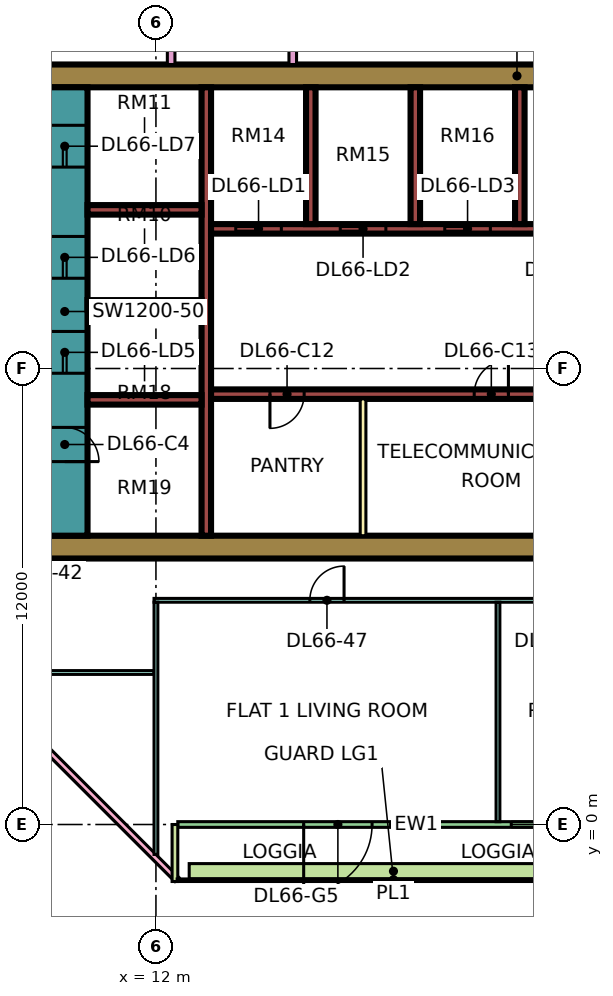
"""IFC4 building model, lengths in metres.
Left out: names, types, materials, properties, quantities, classifications, styles, units other than length and angle.
Written with IfcOpenShell. Run it as: python <this file> out.ifc"""

import sys

from ifc_helpers import new_model, si_unit, direction, frame, frame_2d, origin, place, context, subcontext, project, spatial, rectangle, extrude, element, fill, save


model = new_model("IFC4")
c1 = context("Model", 3, precision=1e-05, world=origin(), true_north=direction((0.0, 1.0)))
c2 = subcontext(c1, "Body", "Model", "MODEL_VIEW")
j1 = project(units=[si_unit("LENGTHUNIT", "METRE"), si_unit("PLANEANGLEUNIT", "RADIAN")], contexts=[c1])
p1 = place(None, origin())
s1 = spatial("IfcSite", under=j1, at=p1, CompositionType="ELEMENT")
p2 = place(p1, origin())
s2 = spatial("IfcBuilding", under=s1, at=p2, CompositionType="ELEMENT")
p3 = place(p2, frame((0.0, 0.0, 284.65)))
s3 = spatial("IfcBuildingStorey", under=s2, at=p3, CompositionType="ELEMENT", Elevation=284.65)
p4 = place(p3, frame((9.0, 7.3, 0.0), z_axis=(0.0, 0.0, 1.0), x_axis=(1.0, 0.0, 0.0)))
e1 = element("IfcWall", 1, at=p4, inside=s3, PredefinedType="SHEAR", context=c2, shape_type="SweptSolid", body=[
    extrude(rectangle(XDim=25.0, YDim=0.6, at=frame_2d((12.5, 0.0))), origin(), (0.0, 0.0, 1.0), 3.75),
])
p5 = place(p3, frame((9.0, 19.7, 0.0), z_axis=(0.0, 0.0, 1.0), x_axis=(1.0, 0.0, 0.0)))
e2 = element("IfcWall", 2, at=p5, inside=s3, PredefinedType="SHEAR", context=c2, shape_type="SweptSolid", body=[
    extrude(rectangle(XDim=25.0, YDim=0.6, at=frame_2d((12.5, 0.0))), origin(), (0.0, 0.0, 1.0), 3.75),
])
p6 = place(p5, frame((19.1, 0.0, 0.0)))
e3 = element("IfcOpeningElement", 3, at=p6, cuts=e2, PredefinedType="OPENING", context=c2, shape_type="SweptSolid", body=[
    extrude(rectangle(XDim=1.8, YDim=2.4, at=frame_2d((0.9, 1.2))), frame((0.0, 0.31, 0.0), z_axis=(0.0, -1.0, 0.0), x_axis=(1.0, 0.0, 0.0)), (0.0, 0.0, 1.0), 0.62),
])
p7 = place(p3, frame((9.6, 7.6, 0.0), z_axis=(0.0, 0.0, 1.0), x_axis=(0.0, 1.0, 0.0)))
e4 = element("IfcWall", 4, at=p7, inside=s3, PredefinedType="SHEAR", context=c2, shape_type="SweptSolid", body=[
    extrude(rectangle(XDim=11.8, YDim=1.2, at=frame_2d((5.9, 0.0))), origin(), (0.0, 0.0, 1.0), 3.75),
])
p8 = place(p7, frame((4.275, 0.0, 0.0)))
e5 = element("IfcOpeningElement", 5, at=p8, cuts=e4, PredefinedType="OPENING", context=c2, shape_type="SweptSolid", body=[
    extrude(rectangle(XDim=1.1, YDim=2.2, at=frame_2d((0.55, 1.1))), frame((0.0, 0.61, 0.0), z_axis=(0.0, -1.0, 0.0), x_axis=(1.0, 0.0, 0.0)), (0.0, 0.0, 1.0), 1.22),
])
p9 = place(p7, frame((6.775, 0.0, 0.0)))
e6 = element("IfcOpeningElement", 6, at=p9, cuts=e4, PredefinedType="OPENING", context=c2, shape_type="SweptSolid", body=[
    extrude(rectangle(XDim=1.1, YDim=2.2, at=frame_2d((0.55, 1.1))), frame((0.0, 0.61, 0.0), z_axis=(0.0, -1.0, 0.0), x_axis=(1.0, 0.0, 0.0)), (0.0, 0.0, 1.0), 1.22),
])
p10 = place(p7, frame((9.7, 0.0, 0.0)))
e7 = element("IfcOpeningElement", 7, at=p10, cuts=e4, PredefinedType="OPENING", context=c2, shape_type="SweptSolid", body=[
    extrude(rectangle(XDim=1.1, YDim=2.2, at=frame_2d((0.55, 1.1))), frame((0.0, 0.61, 0.0), z_axis=(0.0, -1.0, 0.0), x_axis=(1.0, 0.0, 0.0)), (0.0, 0.0, 1.0), 1.22),
])
p11 = place(p7, frame((1.95, 0.0, 0.0)))
e8 = element("IfcOpeningElement", 8, at=p11, cuts=e4, PredefinedType="OPENING", context=c2, shape_type="SweptSolid", body=[
    extrude(rectangle(XDim=0.9, YDim=2.1, at=frame_2d((0.45, 1.05))), frame((0.0, 0.61, 0.0), z_axis=(0.0, -1.0, 0.0), x_axis=(1.0, 0.0, 0.0)), (0.0, 0.0, 1.0), 1.22),
])
p12 = place(p3, frame((13.325, 7.6, 0.0), z_axis=(0.0, 0.0, 1.0), x_axis=(0.0, 1.0, 0.0)))
e9 = element("IfcWall", 9, at=p12, inside=s3, PredefinedType="SHEAR", context=c2, shape_type="SweptSolid", body=[
    extrude(rectangle(XDim=11.8, YDim=0.25, at=frame_2d((5.9, 0.0))), origin(), (0.0, 0.0, 1.0), 3.75),
])
p13 = place(p3, frame((13.45, 11.325, 0.0), z_axis=(0.0, 0.0, 1.0), x_axis=(1.0, 0.0, 0.0)))
e10 = element("IfcWall", 10, at=p13, inside=s3, PredefinedType="SHEAR", context=c2, shape_type="SweptSolid", body=[
    extrude(rectangle(XDim=19.95, YDim=0.25, at=frame_2d((9.975, 0.0))), origin(), (0.0, 0.0, 1.0), 3.75),
])
p14 = place(p13, frame((1.55, 0.0, 0.0)))
e11 = element("IfcOpeningElement", 11, at=p14, cuts=e10, PredefinedType="OPENING", context=c2, shape_type="SweptSolid", body=[
    extrude(rectangle(XDim=0.9, YDim=2.1, at=frame_2d((0.45, 1.05))), frame((0.0, 0.135, 0.0), z_axis=(0.0, -1.0, 0.0), x_axis=(1.0, 0.0, 0.0)), (0.0, 0.0, 1.0), 0.27),
])
p15 = place(p13, frame((6.925, 0.0, 0.0)))
e12 = element("IfcOpeningElement", 12, at=p15, cuts=e10, PredefinedType="OPENING", context=c2, shape_type="SweptSolid", body=[
    extrude(rectangle(XDim=0.9, YDim=2.1, at=frame_2d((0.45, 1.05))), frame((0.0, 0.135, 0.0), z_axis=(0.0, -1.0, 0.0), x_axis=(1.0, 0.0, 0.0)), (0.0, 0.0, 1.0), 0.27),
])
p16 = place(p13, frame((15.025, 0.0, 0.0)))
e13 = element("IfcOpeningElement", 13, at=p16, cuts=e10, PredefinedType="OPENING", context=c2, shape_type="SweptSolid", body=[
    extrude(rectangle(XDim=0.9, YDim=2.1, at=frame_2d((0.45, 1.05))), frame((0.0, 0.135, 0.0), z_axis=(0.0, -1.0, 0.0), x_axis=(1.0, 0.0, 0.0)), (0.0, 0.0, 1.0), 0.27),
])
p17 = place(p3, frame((13.45, 15.675, 0.0), z_axis=(0.0, 0.0, 1.0), x_axis=(1.0, 0.0, 0.0)))
e14 = element("IfcWall", 14, at=p17, inside=s3, PredefinedType="SHEAR", context=c2, shape_type="SweptSolid", body=[
    extrude(rectangle(XDim=13.75, YDim=0.25, at=frame_2d((6.875, 0.0))), origin(), (0.0, 0.0, 1.0), 3.75),
])
p18 = place(p17, frame((0.65, 0.0, 0.0)))
e15 = element("IfcOpeningElement", 15, at=p18, cuts=e14, PredefinedType="OPENING", context=c2, shape_type="SweptSolid", body=[
    extrude(rectangle(XDim=1.2, YDim=2.2, at=frame_2d((0.6, 1.1))), frame((0.0, 0.135, 0.0), z_axis=(0.0, -1.0, 0.0), x_axis=(1.0, 0.0, 0.0)), (0.0, 0.0, 1.0), 0.27),
])
p19 = place(p17, frame((3.4, 0.0, 0.0)))
e16 = element("IfcOpeningElement", 16, at=p19, cuts=e14, PredefinedType="OPENING", context=c2, shape_type="SweptSolid", body=[
    extrude(rectangle(XDim=1.2, YDim=2.2, at=frame_2d((0.6, 1.1))), frame((0.0, 0.135, 0.0), z_axis=(0.0, -1.0, 0.0), x_axis=(1.0, 0.0, 0.0)), (0.0, 0.0, 1.0), 0.27),
])
p20 = place(p17, frame((6.15, 0.0, 0.0)))
e17 = element("IfcOpeningElement", 17, at=p20, cuts=e14, PredefinedType="OPENING", context=c2, shape_type="SweptSolid", body=[
    extrude(rectangle(XDim=1.2, YDim=2.2, at=frame_2d((0.6, 1.1))), frame((0.0, 0.135, 0.0), z_axis=(0.0, -1.0, 0.0), x_axis=(1.0, 0.0, 0.0)), (0.0, 0.0, 1.0), 0.27),
])
p21 = place(p17, frame((8.9, 0.0, 0.0)))
e18 = element("IfcOpeningElement", 18, at=p21, cuts=e14, PredefinedType="OPENING", context=c2, shape_type="SweptSolid", body=[
    extrude(rectangle(XDim=1.2, YDim=2.2, at=frame_2d((0.6, 1.1))), frame((0.0, 0.135, 0.0), z_axis=(0.0, -1.0, 0.0), x_axis=(1.0, 0.0, 0.0)), (0.0, 0.0, 1.0), 0.27),
])
p22 = place(p17, frame((11.8, 0.0, 0.0)))
e19 = element("IfcOpeningElement", 19, at=p22, cuts=e14, PredefinedType="OPENING", context=c2, shape_type="SweptSolid", body=[
    extrude(rectangle(XDim=0.9, YDim=2.1, at=frame_2d((0.45, 1.05))), frame((0.0, 0.135, 0.0), z_axis=(0.0, -1.0, 0.0), x_axis=(1.0, 0.0, 0.0)), (0.0, 0.0, 1.0), 0.27),
])
for number, where, z_axis, x_axis in (
    (20, (10.2, 11.175, 0.0), (0.0, 0.0, 1.0), (1.0, 0.0, 0.0)),
    (21, (10.2, 13.675, 0.0), (0.0, 0.0, 1.0), (1.0, 0.0, 0.0)),
    (22, (10.2, 16.175, 0.0), (0.0, 0.0, 1.0), (1.0, 0.0, 0.0)),
):
    element("IfcWall", number, at=place(p3, frame(where, z_axis=z_axis, x_axis=x_axis)), inside=s3, PredefinedType="SHEAR", context=c2, shape_type="SweptSolid", body=[
        extrude(rectangle(XDim=3.0, YDim=0.25, at=frame_2d((1.5, 0.0))), origin(), (0.0, 0.0, 1.0), 3.75),
    ])
for number, where, z_axis, x_axis in (
    (23, (16.075, 15.8, 0.0), (0.0, 0.0, 1.0), (0.0, 1.0, 0.0)),
    (24, (18.825, 15.8, 0.0), (0.0, 0.0, 1.0), (0.0, 1.0, 0.0)),
    (25, (21.575, 15.8, 0.0), (0.0, 0.0, 1.0), (0.0, 1.0, 0.0)),
):
    element("IfcWall", number, at=place(p3, frame(where, z_axis=z_axis, x_axis=x_axis)), inside=s3, PredefinedType="SHEAR", context=c2, shape_type="SweptSolid", body=[
        extrude(rectangle(XDim=3.6, YDim=0.25, at=frame_2d((1.8, 0.0))), origin(), (0.0, 0.0, 1.0), 3.75),
    ])
p23 = place(p3, frame((-1.447, 12.553, 0.0), z_axis=(0.0, 0.0, 1.0), x_axis=(0.707106781187, -0.707106781187, 0.0)))
e26 = element("IfcWall", 26, at=p23, inside=s3, PredefinedType="SOLIDWALL", context=c2, shape_type="SweptSolid", body=[
    extrude(rectangle(XDim=19.799, YDim=0.15, at=frame_2d((9.899, 0.0))), origin(), (0.0, 0.0, 1.0), 3.35),
])
p24 = place(p23, frame((2.212, 0.0, 0.45)))
e27 = element("IfcOpeningElement", 27, at=p24, cuts=e26, PredefinedType="OPENING", context=c2, shape_type="SweptSolid", body=[
    extrude(rectangle(XDim=3.0, YDim=2.4, at=frame_2d((1.5, 1.2))), frame((0.0, 0.085, 0.0), z_axis=(0.0, -1.0, 0.0), x_axis=(1.0, 0.0, 0.0)), (0.0, 0.0, 1.0), 0.17),
])
p25 = place(p23, frame((10.216, 0.0, 0.45)))
e28 = element("IfcOpeningElement", 28, at=p25, cuts=e26, PredefinedType="OPENING", context=c2, shape_type="SweptSolid", body=[
    extrude(rectangle(XDim=3.0, YDim=2.4, at=frame_2d((1.5, 1.2))), frame((0.0, 0.085, 0.0), z_axis=(0.0, -1.0, 0.0), x_axis=(1.0, 0.0, 0.0)), (0.0, 0.0, 1.0), 0.17),
])
p26 = place(p3, frame((12.575, 0.0, 0.0), z_axis=(0.0, 0.0, 1.0), x_axis=(1.0, 0.0, 0.0)))
e29 = element("IfcWall", 29, at=p26, inside=s3, PredefinedType="SOLIDWALL", context=c2, shape_type="SweptSolid", body=[
    extrude(rectangle(XDim=11.35, YDim=0.15, at=frame_2d((5.675, 0.0))), origin(), (0.0, 0.0, 1.0), 3.35),
])
p27 = place(p26, frame((3.312, 0.0, 0.0)))
e30 = element("IfcOpeningElement", 30, at=p27, cuts=e29, PredefinedType="OPENING", context=c2, shape_type="SweptSolid", body=[
    extrude(rectangle(XDim=1.8, YDim=2.4, at=frame_2d((0.9, 1.2))), frame((0.0, 0.085, 0.0), z_axis=(0.0, -1.0, 0.0), x_axis=(1.0, 0.0, 0.0)), (0.0, 0.0, 1.0), 0.17),
])
p28 = place(p26, frame((8.775, 0.0, 0.45)))
e31 = element("IfcOpeningElement", 31, at=p28, cuts=e29, PredefinedType="OPENING", context=c2, shape_type="SweptSolid", body=[
    extrude(rectangle(XDim=1.8, YDim=2.4, at=frame_2d((0.9, 1.2))), frame((0.0, 0.085, 0.0), z_axis=(0.0, -1.0, 0.0), x_axis=(1.0, 0.0, 0.0)), (0.0, 0.0, 1.0), 0.17),
])
p29 = place(p3, frame((12.5, -1.5, 0.0), z_axis=(0.0, 0.0, 1.0), x_axis=(0.0, 1.0, 0.0)))
e32 = element("IfcWall", 32, at=p29, inside=s3, PredefinedType="SOLIDWALL", context=c2, shape_type="SweptSolid", body=[
    extrude(rectangle(XDim=1.5, YDim=0.15, at=frame_2d((0.75, 0.0))), origin(), (0.0, 0.0, 1.0), 3.35),
])
p30 = place(p3, frame((12.875, -1.229, 0.0), z_axis=(0.0, 0.0, 1.0), x_axis=(1.0, 0.0, 0.0)))
e33 = element("IfcWall", 33, at=p30, inside=s3, PredefinedType="SOLIDWALL", context=c2, shape_type="SweptSolid", body=[
    extrude(rectangle(XDim=10.75, YDim=0.4, at=frame_2d((5.375, 0.0))), origin(), (0.0, 0.0, 1.0), 0.7),
])
p31 = place(p3, frame((17.45, 7.6, 0.0), z_axis=(0.0, 0.0, 1.0), x_axis=(0.0, 1.0, 0.0)))
e34 = element("IfcWall", 34, at=p31, inside=s3, PredefinedType="PARTITIONING", context=c2, shape_type="SweptSolid", body=[
    extrude(rectangle(XDim=3.6, YDim=0.15, at=frame_2d((1.8, 0.0))), origin(), (0.0, 0.0, 1.0), 3.35),
])
p32 = place(p3, frame((9.05, 4.0, 0.0), z_axis=(0.0, 0.0, 1.0), x_axis=(1.0, 0.0, 0.0)))
e35 = element("IfcWall", 35, at=p32, inside=s3, PredefinedType="PARTITIONING", context=c2, shape_type="SweptSolid", body=[
    extrude(rectangle(XDim=2.9, YDim=0.1, at=frame_2d((1.45, 0.0))), origin(), (0.0, 0.0, 1.0), 3.35),
])
p33 = place(p3, frame((11.95, 5.9, 0.0), z_axis=(0.0, 0.0, 1.0), x_axis=(1.0, 0.0, 0.0)))
e36 = element("IfcWall", 36, at=p33, inside=s3, PredefinedType="PARTITIONING", context=c2, shape_type="SweptSolid", body=[
    extrude(rectangle(XDim=21.1, YDim=0.1, at=frame_2d((10.55, 0.0))), origin(), (0.0, 0.0, 1.0), 3.35),
])
p34 = place(p33, frame((10.1, 0.0, 0.0)))
e37 = element("IfcOpeningElement", 37, at=p34, cuts=e36, PredefinedType="OPENING", context=c2, shape_type="SweptSolid", body=[
    extrude(rectangle(XDim=0.9, YDim=2.1, at=frame_2d((0.45, 1.05))), frame((0.0, 0.06, 0.0), z_axis=(0.0, -1.0, 0.0), x_axis=(1.0, 0.0, 0.0)), (0.0, 0.0, 1.0), 0.12),
])
p35 = place(p33, frame((13.1, 0.0, 0.0)))
e38 = element("IfcOpeningElement", 38, at=p35, cuts=e36, PredefinedType="OPENING", context=c2, shape_type="SweptSolid", body=[
    extrude(rectangle(XDim=0.9, YDim=2.1, at=frame_2d((0.45, 1.05))), frame((0.0, 0.06, 0.0), z_axis=(0.0, -1.0, 0.0), x_axis=(1.0, 0.0, 0.0)), (0.0, 0.0, 1.0), 0.12),
])
p36 = place(p33, frame((16.1, 0.0, 0.0)))
e39 = element("IfcOpeningElement", 39, at=p36, cuts=e36, PredefinedType="OPENING", context=c2, shape_type="SweptSolid", body=[
    extrude(rectangle(XDim=0.9, YDim=2.1, at=frame_2d((0.45, 1.05))), frame((0.0, 0.06, 0.0), z_axis=(0.0, -1.0, 0.0), x_axis=(1.0, 0.0, 0.0)), (0.0, 0.0, 1.0), 0.12),
])
p37 = place(p33, frame((4.1, 0.0, 0.0)))
e40 = element("IfcOpeningElement", 40, at=p37, cuts=e36, PredefinedType="OPENING", context=c2, shape_type="SweptSolid", body=[
    extrude(rectangle(XDim=0.9, YDim=2.1, at=frame_2d((0.45, 1.05))), frame((0.0, 0.06, 0.0), z_axis=(0.0, -1.0, 0.0), x_axis=(1.0, 0.0, 0.0)), (0.0, 0.0, 1.0), 0.12),
])
p38 = place(p3, frame((12.0, -0.788, 0.0), z_axis=(0.0, 0.0, 1.0), x_axis=(0.0, 1.0, 0.0)))
e41 = element("IfcWall", 41, at=p38, inside=s3, PredefinedType="PARTITIONING", context=c2, shape_type="SweptSolid", body=[
    extrude(rectangle(XDim=6.638, YDim=0.1, at=frame_2d((3.319, 0.0))), origin(), (0.0, 0.0, 1.0), 3.35),
])
p39 = place(p3, frame((12.4, 20.0, 0.0), z_axis=(0.0, 0.0, 1.0), x_axis=(0.0, 1.0, 0.0)))
e42 = element("IfcWall", 42, at=p39, inside=s3, PredefinedType="PARTITIONING", context=c2, shape_type="SweptSolid", body=[
    extrude(rectangle(XDim=33.926, YDim=0.2, at=frame_2d((16.963, 0.0))), origin(), (0.0, 0.0, 1.0), 3.35),
])
p40 = place(p39, frame((25.8, 0.0, 0.0)))
e43 = element("IfcOpeningElement", 43, at=p40, cuts=e42, PredefinedType="OPENING", context=c2, shape_type="SweptSolid", body=[
    extrude(rectangle(XDim=1.0, YDim=2.1, at=frame_2d((0.5, 1.05))), frame((0.0, 0.11, 0.0), z_axis=(0.0, -1.0, 0.0), x_axis=(1.0, 0.0, 0.0)), (0.0, 0.0, 1.0), 0.22),
])
p41 = place(p39, frame((0.6, 0.0, 0.0)))
e44 = element("IfcOpeningElement", 44, at=p41, cuts=e42, PredefinedType="OPENING", context=c2, shape_type="SweptSolid", body=[
    extrude(rectangle(XDim=1.2, YDim=2.1, at=frame_2d((0.6, 1.05))), frame((0.0, 0.11, 0.0), z_axis=(0.0, -1.0, 0.0), x_axis=(1.0, 0.0, 0.0)), (0.0, 0.0, 1.0), 0.22),
])
p42 = place(p39, frame((4.5, 0.0, 0.0)))
e45 = element("IfcOpeningElement", 45, at=p42, cuts=e42, PredefinedType="OPENING", context=c2, shape_type="SweptSolid", body=[
    extrude(rectangle(XDim=1.0, YDim=2.1, at=frame_2d((0.5, 1.05))), frame((0.0, 0.11, 0.0), z_axis=(0.0, -1.0, 0.0), x_axis=(1.0, 0.0, 0.0)), (0.0, 0.0, 1.0), 0.22),
])
p43 = place(p3, frame((15.6, 20.0, 0.0), z_axis=(0.0, 0.0, 1.0), x_axis=(0.0, 1.0, 0.0)))
e46 = element("IfcWall", 46, at=p43, inside=s3, PredefinedType="PARTITIONING", context=c2, shape_type="SweptSolid", body=[
    extrude(rectangle(XDim=27.775, YDim=0.2, at=frame_2d((13.887, 0.0))), origin(), (0.0, 0.0, 1.0), 3.35),
])
p44 = place(p43, frame((5.95, 0.0, 0.0)))
e47 = element("IfcOpeningElement", 47, at=p44, cuts=e46, PredefinedType="OPENING", context=c2, shape_type="SweptSolid", body=[
    extrude(rectangle(XDim=1.0, YDim=2.1, at=frame_2d((0.5, 1.05))), frame((0.0, 0.11, 0.0), z_axis=(0.0, -1.0, 0.0), x_axis=(1.0, 0.0, 0.0)), (0.0, 0.0, 1.0), 0.22),
])
p45 = place(p43, frame((12.0, 0.0, 0.0)))
e48 = element("IfcOpeningElement", 48, at=p45, cuts=e46, PredefinedType="OPENING", context=c2, shape_type="SweptSolid", body=[
    extrude(rectangle(XDim=1.0, YDim=2.1, at=frame_2d((0.5, 1.05))), frame((0.0, 0.11, 0.0), z_axis=(0.0, -1.0, 0.0), x_axis=(1.0, 0.0, 0.0)), (0.0, 0.0, 1.0), 0.22),
])
p46 = place(p43, frame((22.9, 0.0, 0.0)))
e49 = element("IfcOpeningElement", 49, at=p46, cuts=e46, PredefinedType="OPENING", context=c2, shape_type="SweptSolid", body=[
    extrude(rectangle(XDim=1.0, YDim=2.1, at=frame_2d((0.5, 1.05))), frame((0.0, 0.11, 0.0), z_axis=(0.0, -1.0, 0.0), x_axis=(1.0, 0.0, 0.0)), (0.0, 0.0, 1.0), 0.22),
])
p47 = place(p43, frame((1.15, 0.0, 0.0)))
e50 = element("IfcOpeningElement", 50, at=p47, cuts=e46, PredefinedType="OPENING", context=c2, shape_type="SweptSolid", body=[
    extrude(rectangle(XDim=1.8, YDim=2.1, at=frame_2d((0.9, 1.05))), frame((0.0, 0.11, 0.0), z_axis=(0.0, -1.0, 0.0), x_axis=(1.0, 0.0, 0.0)), (0.0, 0.0, 1.0), 0.22),
])
p48 = place(p43, frame((25.9, 0.0, 0.0)))
e51 = element("IfcOpeningElement", 51, at=p48, cuts=e46, PredefinedType="OPENING", context=c2, shape_type="SweptSolid", body=[
    extrude(rectangle(XDim=1.0, YDim=2.1, at=frame_2d((0.5, 1.05))), frame((0.0, 0.11, 0.0), z_axis=(0.0, -1.0, 0.0), x_axis=(1.0, 0.0, 0.0)), (0.0, 0.0, 1.0), 0.22),
])
p49 = place(p3, frame((21.0, 0.074, 0.0), z_axis=(0.0, 0.0, 1.0), x_axis=(0.0, 1.0, 0.0)))
e52 = element("IfcWall", 52, at=p49, inside=s3, PredefinedType="PARTITIONING", context=c2, shape_type="SweptSolid", body=[
    extrude(rectangle(XDim=5.776, YDim=0.1, at=frame_2d((2.888, 0.0))), origin(), (0.0, 0.0, 1.0), 3.35),
])
p50 = place(p27, frame((1.8, 0.0, 0.0), z_axis=(0.0, 0.0, 1.0), x_axis=(-1.0, 0.0, 0.0)))
e53 = element("IfcDoor", 53, at=p50, inside=s3, OperationType="DOUBLE_DOOR_SINGLE_SWING", PredefinedType="DOOR", context=c2, shape_type="SweptSolid", body=[
    extrude(rectangle(XDim=1.8, YDim=2.4, at=frame_2d((0.9, 1.2))), frame((0.0, 0.025, 0.0), z_axis=(0.0, -1.0, 0.0), x_axis=(1.0, 0.0, 0.0)), (0.0, 0.0, 1.0), 0.05),
])
fill(e30, e53)
p51 = place(p28, origin())
e54 = element("IfcWindow", 54, at=p51, inside=s3, PartitioningType="SINGLE_PANEL", PredefinedType="WINDOW", context=c2, shape_type="SweptSolid", body=[
    extrude(rectangle(XDim=1.8, YDim=2.4, at=frame_2d((0.9, 1.2))), frame((0.0, 0.03, 0.0), z_axis=(0.0, -1.0, 0.0), x_axis=(1.0, 0.0, 0.0)), (0.0, 0.0, 1.0), 0.06),
])
fill(e31, e54)
p52 = place(p18, origin())
e55 = element("IfcDoor", 55, at=p52, inside=s3, OperationType="DOUBLE_DOOR_SLIDING", PredefinedType="DOOR", context=c2, shape_type="SweptSolid", body=[
    extrude(rectangle(XDim=1.2, YDim=2.2, at=frame_2d((0.6, 1.1))), frame((0.0, 0.025, 0.0), z_axis=(0.0, -1.0, 0.0), x_axis=(1.0, 0.0, 0.0)), (0.0, 0.0, 1.0), 0.05),
])
fill(e15, e55)
p53 = place(p19, origin())
e56 = element("IfcDoor", 56, at=p53, inside=s3, OperationType="DOUBLE_DOOR_SLIDING", PredefinedType="DOOR", context=c2, shape_type="SweptSolid", body=[
    extrude(rectangle(XDim=1.2, YDim=2.2, at=frame_2d((0.6, 1.1))), frame((0.0, 0.025, 0.0), z_axis=(0.0, -1.0, 0.0), x_axis=(1.0, 0.0, 0.0)), (0.0, 0.0, 1.0), 0.05),
])
fill(e16, e56)
p54 = place(p20, origin())
e57 = element("IfcDoor", 57, at=p54, inside=s3, OperationType="DOUBLE_DOOR_SLIDING", PredefinedType="DOOR", context=c2, shape_type="SweptSolid", body=[
    extrude(rectangle(XDim=1.2, YDim=2.2, at=frame_2d((0.6, 1.1))), frame((0.0, 0.025, 0.0), z_axis=(0.0, -1.0, 0.0), x_axis=(1.0, 0.0, 0.0)), (0.0, 0.0, 1.0), 0.05),
])
fill(e17, e57)
p55 = place(p8, origin())
e58 = element("IfcDoor", 58, at=p55, inside=s3, OperationType="DOUBLE_DOOR_SLIDING", PredefinedType="DOOR", context=c2, shape_type="SweptSolid", body=[
    extrude(rectangle(XDim=1.1, YDim=2.2, at=frame_2d((0.55, 1.1))), frame((0.0, 0.025, 0.0), z_axis=(0.0, -1.0, 0.0), x_axis=(1.0, 0.0, 0.0)), (0.0, 0.0, 1.0), 0.05),
])
fill(e5, e58)
p56 = place(p9, origin())
e59 = element("IfcDoor", 59, at=p56, inside=s3, OperationType="DOUBLE_DOOR_SLIDING", PredefinedType="DOOR", context=c2, shape_type="SweptSolid", body=[
    extrude(rectangle(XDim=1.1, YDim=2.2, at=frame_2d((0.55, 1.1))), frame((0.0, 0.025, 0.0), z_axis=(0.0, -1.0, 0.0), x_axis=(1.0, 0.0, 0.0)), (0.0, 0.0, 1.0), 0.05),
])
fill(e6, e59)
p57 = place(p10, origin())
e60 = element("IfcDoor", 60, at=p57, inside=s3, OperationType="DOUBLE_DOOR_SLIDING", PredefinedType="DOOR", context=c2, shape_type="SweptSolid", body=[
    extrude(rectangle(XDim=1.1, YDim=2.2, at=frame_2d((0.55, 1.1))), frame((0.0, 0.025, 0.0), z_axis=(0.0, -1.0, 0.0), x_axis=(1.0, 0.0, 0.0)), (0.0, 0.0, 1.0), 0.05),
])
fill(e7, e60)
p58 = place(p11, frame((0.9, 0.0, 0.0), z_axis=(0.0, 0.0, 1.0), x_axis=(-1.0, 0.0, 0.0)))
e61 = element("IfcDoor", 61, at=p58, inside=s3, OperationType="SINGLE_SWING_LEFT", PredefinedType="DOOR", context=c2, shape_type="SweptSolid", body=[
    extrude(rectangle(XDim=0.9, YDim=2.1, at=frame_2d((0.45, 1.05))), frame((0.0, 0.025, 0.0), z_axis=(0.0, -1.0, 0.0), x_axis=(1.0, 0.0, 0.0)), (0.0, 0.0, 1.0), 0.05),
])
fill(e8, e61)
p59 = place(p14, frame((0.9, 0.0, 0.0), z_axis=(0.0, 0.0, 1.0), x_axis=(-1.0, 0.0, 0.0)))
e62 = element("IfcDoor", 62, at=p59, inside=s3, OperationType="SINGLE_SWING_LEFT", PredefinedType="DOOR", context=c2, shape_type="SweptSolid", body=[
    extrude(rectangle(XDim=0.9, YDim=2.1, at=frame_2d((0.45, 1.05))), frame((0.0, 0.025, 0.0), z_axis=(0.0, -1.0, 0.0), x_axis=(1.0, 0.0, 0.0)), (0.0, 0.0, 1.0), 0.05),
])
fill(e11, e62)
p60 = place(p15, frame((0.9, 0.0, 0.0), z_axis=(0.0, 0.0, 1.0), x_axis=(-1.0, 0.0, 0.0)))
e63 = element("IfcDoor", 63, at=p60, inside=s3, OperationType="SINGLE_SWING_RIGHT", PredefinedType="DOOR", context=c2, shape_type="SweptSolid", body=[
    extrude(rectangle(XDim=0.9, YDim=2.1, at=frame_2d((0.45, 1.05))), frame((0.0, 0.025, 0.0), z_axis=(0.0, -1.0, 0.0), x_axis=(1.0, 0.0, 0.0)), (0.0, 0.0, 1.0), 0.05),
])
fill(e12, e63)
p61 = place(p37, frame((0.9, 0.0, 0.0), z_axis=(0.0, 0.0, 1.0), x_axis=(-1.0, 0.0, 0.0)))
e64 = element("IfcDoor", 64, at=p61, inside=s3, OperationType="SINGLE_SWING_RIGHT", PredefinedType="DOOR", context=c2, shape_type="SweptSolid", body=[
    extrude(rectangle(XDim=0.9, YDim=2.1, at=frame_2d((0.45, 1.05))), frame((0.0, 0.025, 0.0), z_axis=(0.0, -1.0, 0.0), x_axis=(1.0, 0.0, 0.0)), (0.0, 0.0, 1.0), 0.05),
])
fill(e40, e64)
save(model, sys.argv[1])
